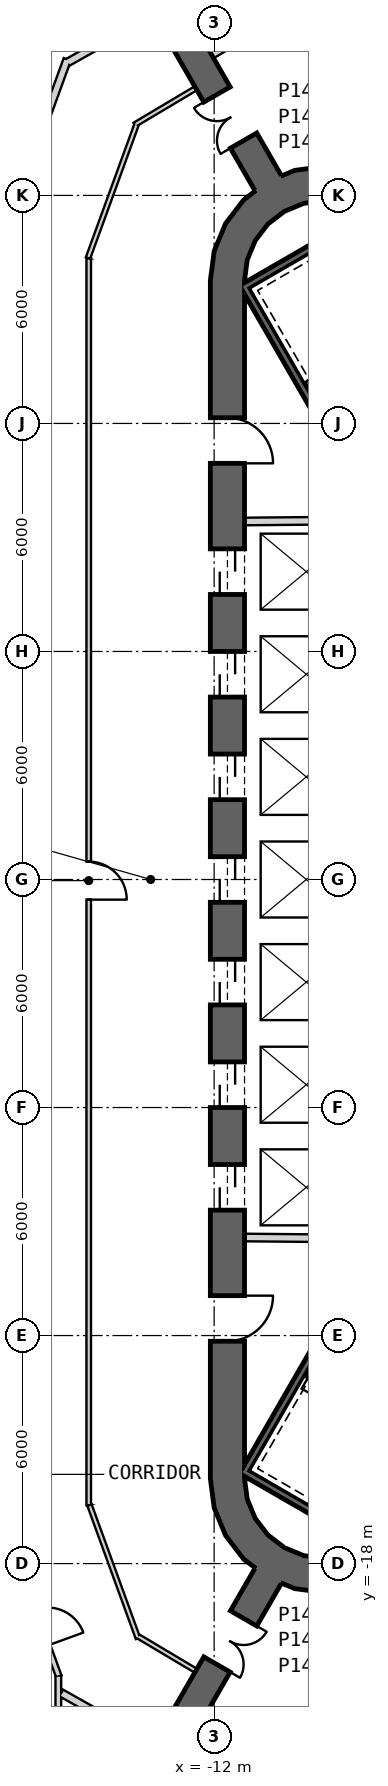
"""IFC4 building model, lengths in metres.
Left out: names, types, materials, properties, quantities, classifications, styles, units other than length and angle.
Written with IfcOpenShell. Run it as: python <this file> out.ifc"""

import sys

from ifc_helpers import new_model, si_unit, direction, frame, frame_2d, origin, place, context, subcontext, project, spatial, polyline, rectangle, outline, extrude, element, fill, save


model = new_model("IFC4")
c1 = context("Model", 3, precision=1e-05, world=origin(), true_north=direction((0.0, 1.0)))
c2 = subcontext(c1, "Body", "Model", "MODEL_VIEW")
j1 = project(units=[si_unit("LENGTHUNIT", "METRE"), si_unit("PLANEANGLEUNIT", "RADIAN")], contexts=[c1])
p1 = place(None, origin())
s1 = spatial("IfcSite", under=j1, at=p1, CompositionType="ELEMENT")
p2 = place(p1, origin())
s2 = spatial("IfcBuilding", under=s1, at=p2, CompositionType="ELEMENT")
p3 = place(p2, frame((0.0, 0.0, 107.0)))
s3 = spatial("IfcBuildingStorey", under=s2, at=p3, CompositionType="ELEMENT", Elevation=107.0)
p4 = place(p3, frame((-11.65, 15.762, 0.0), z_axis=(0.0, 0.0, 1.0), x_axis=(0.0, -1.0, 0.0)))
e1 = element("IfcWall", 1, at=p4, inside=s3, PredefinedType="SHEAR", context=c2, shape_type="SweptSolid", body=[
    extrude(rectangle(XDim=31.523, YDim=0.9, at=frame_2d((15.762, 0.0))), origin(), (0.0, 0.0, 1.0), 4.1),
])
p5 = place(p4, frame((7.062, 0.0, 0.0)))
e2 = element("IfcOpeningElement", 2, at=p5, cuts=e1, PredefinedType="OPENING", context=c2, shape_type="SweptSolid", body=[
    extrude(rectangle(XDim=1.2, YDim=2.4, at=frame_2d((0.6, 1.2))), frame((0.0, 0.46, 0.0), z_axis=(0.0, -1.0, 0.0), x_axis=(1.0, 0.0, 0.0)), (0.0, 0.0, 1.0), 0.92),
])
p6 = place(p4, frame((9.762, 0.0, 0.0)))
e3 = element("IfcOpeningElement", 3, at=p6, cuts=e1, PredefinedType="OPENING", context=c2, shape_type="SweptSolid", body=[
    extrude(rectangle(XDim=1.2, YDim=2.4, at=frame_2d((0.6, 1.2))), frame((0.0, 0.46, 0.0), z_axis=(0.0, -1.0, 0.0), x_axis=(1.0, 0.0, 0.0)), (0.0, 0.0, 1.0), 0.92),
])
p7 = place(p4, frame((12.462, 0.0, 0.0)))
e4 = element("IfcOpeningElement", 4, at=p7, cuts=e1, PredefinedType="OPENING", context=c2, shape_type="SweptSolid", body=[
    extrude(rectangle(XDim=1.2, YDim=2.4, at=frame_2d((0.6, 1.2))), frame((0.0, 0.46, 0.0), z_axis=(0.0, -1.0, 0.0), x_axis=(1.0, 0.0, 0.0)), (0.0, 0.0, 1.0), 0.92),
])
p8 = place(p4, frame((15.162, 0.0, 0.0)))
e5 = element("IfcOpeningElement", 5, at=p8, cuts=e1, PredefinedType="OPENING", context=c2, shape_type="SweptSolid", body=[
    extrude(rectangle(XDim=1.2, YDim=2.4, at=frame_2d((0.6, 1.2))), frame((0.0, 0.46, 0.0), z_axis=(0.0, -1.0, 0.0), x_axis=(1.0, 0.0, 0.0)), (0.0, 0.0, 1.0), 0.92),
])
p9 = place(p4, frame((17.862, 0.0, 0.0)))
e6 = element("IfcOpeningElement", 6, at=p9, cuts=e1, PredefinedType="OPENING", context=c2, shape_type="SweptSolid", body=[
    extrude(rectangle(XDim=1.2, YDim=2.4, at=frame_2d((0.6, 1.2))), frame((0.0, 0.46, 0.0), z_axis=(0.0, -1.0, 0.0), x_axis=(1.0, 0.0, 0.0)), (0.0, 0.0, 1.0), 0.92),
])
p10 = place(p4, frame((20.562, 0.0, 0.0)))
e7 = element("IfcOpeningElement", 7, at=p10, cuts=e1, PredefinedType="OPENING", context=c2, shape_type="SweptSolid", body=[
    extrude(rectangle(XDim=1.2, YDim=2.4, at=frame_2d((0.6, 1.2))), frame((0.0, 0.46, 0.0), z_axis=(0.0, -1.0, 0.0), x_axis=(1.0, 0.0, 0.0)), (0.0, 0.0, 1.0), 0.92),
])
p11 = place(p4, frame((23.262, 0.0, 0.0)))
e8 = element("IfcOpeningElement", 8, at=p11, cuts=e1, PredefinedType="OPENING", context=c2, shape_type="SweptSolid", body=[
    extrude(rectangle(XDim=1.2, YDim=2.4, at=frame_2d((0.6, 1.2))), frame((0.0, 0.46, 0.0), z_axis=(0.0, -1.0, 0.0), x_axis=(1.0, 0.0, 0.0)), (0.0, 0.0, 1.0), 0.92),
])
p12 = place(p4, frame((3.612, 0.0, 0.0)))
e9 = element("IfcOpeningElement", 9, at=p12, cuts=e1, PredefinedType="OPENING", context=c2, shape_type="SweptSolid", body=[
    extrude(rectangle(XDim=1.2, YDim=2.4, at=frame_2d((0.6, 1.2))), frame((0.0, 0.46, 0.0), z_axis=(0.0, -1.0, 0.0), x_axis=(1.0, 0.0, 0.0)), (0.0, 0.0, 1.0), 0.92),
])
p13 = place(p4, frame((26.712, 0.0, 0.0)))
e10 = element("IfcOpeningElement", 10, at=p13, cuts=e1, PredefinedType="OPENING", context=c2, shape_type="SweptSolid", body=[
    extrude(rectangle(XDim=1.2, YDim=2.4, at=frame_2d((0.6, 1.2))), frame((0.0, 0.46, 0.0), z_axis=(0.0, -1.0, 0.0), x_axis=(1.0, 0.0, 0.0)), (0.0, 0.0, 1.0), 0.92),
])
p14 = place(p3, origin())
e11 = element("IfcWall", 11, at=p14, inside=s3, PredefinedType="SHEAR", context=c2, shape_type="SweptSolid", body=[
    extrude(outline(polyline([(-7.6, 18.36), (-8.323, 18.659), (-9.1, 18.762), (-9.876, 18.659), (-10.6, 18.36), (-11.221, 17.883), (-11.698, 17.262), (-11.998, 16.538), (-12.1, 15.762), (-11.2, 15.762), (-11.128, 16.305), (-10.919, 16.812), (-10.585, 17.247), (-10.15, 17.58), (-9.644, 17.79), (-9.1, 17.862), (-8.556, 17.79), (-8.05, 17.58), (-7.6, 18.36)])), origin(), (0.0, 0.0, 1.0), 4.1),
])
p15 = place(p3, origin())
e12 = element("IfcWall", 12, at=p15, inside=s3, PredefinedType="SHEAR", context=c2, shape_type="SweptSolid", body=[
    extrude(outline(polyline([(-12.1, -15.762), (-11.998, -16.538), (-11.698, -17.262), (-11.221, -17.883), (-10.6, -18.36), (-9.876, -18.659), (-9.1, -18.762), (-8.323, -18.659), (-7.6, -18.36), (-8.05, -17.58), (-8.556, -17.79), (-9.1, -17.862), (-9.644, -17.79), (-10.15, -17.58), (-10.585, -17.247), (-10.919, -16.812), (-11.128, -16.305), (-11.2, -15.762), (-12.1, -15.762)])), origin(), (0.0, 0.0, 1.0), 4.1),
])
p16 = place(p3, frame((-10.575, 18.316, 0.0), z_axis=(0.0, 0.0, 1.0), x_axis=(-0.500003112169, 0.866023606965, 0.0)))
e13 = element("IfcWall", 13, at=p16, inside=s3, PredefinedType="SHEAR", context=c2, shape_type="SweptSolid", body=[
    extrude(rectangle(XDim=13.027, YDim=0.8, at=frame_2d((6.513, 0.0))), origin(), (0.0, 0.0, 1.0), 4.1),
])
p17 = place(p16, frame((1.3, 0.0, 0.0)))
e14 = element("IfcOpeningElement", 14, at=p17, cuts=e13, PredefinedType="OPENING", context=c2, shape_type="SweptSolid", body=[
    extrude(rectangle(XDim=1.4, YDim=2.4, at=frame_2d((0.7, 1.2))), frame((0.0, 0.41, 0.0), z_axis=(0.0, -1.0, 0.0), x_axis=(1.0, 0.0, 0.0)), (0.0, 0.0, 1.0), 0.82),
])
p18 = place(p3, frame((-10.575, -18.316, 0.0), z_axis=(0.0, 0.0, 1.0), x_axis=(-0.500003112169, -0.866023606965, 0.0)))
e15 = element("IfcWall", 15, at=p18, inside=s3, PredefinedType="SHEAR", context=c2, shape_type="SweptSolid", body=[
    extrude(rectangle(XDim=13.027, YDim=0.8, at=frame_2d((6.513, 0.0))), origin(), (0.0, 0.0, 1.0), 4.1),
])
p19 = place(p18, frame((1.3, 0.0, 0.0)))
e16 = element("IfcOpeningElement", 16, at=p19, cuts=e15, PredefinedType="OPENING", context=c2, shape_type="SweptSolid", body=[
    extrude(rectangle(XDim=1.4, YDim=2.4, at=frame_2d((0.7, 1.2))), frame((0.0, 0.41, 0.0), z_axis=(0.0, -1.0, 0.0), x_axis=(1.0, 0.0, 0.0)), (0.0, 0.0, 1.0), 0.82),
])
p20 = place(p3, frame((-11.2, 9.42, 0.0), z_axis=(0.0, 0.0, 1.0), x_axis=(0.999957167047, 0.009255488683, 0.0)))
e17 = element("IfcWall", 17, at=p20, inside=s3, PredefinedType="PLUMBINGWALL", context=c2, shape_type="SweptSolid", body=[
    extrude(rectangle(XDim=3.35, YDim=0.2, at=frame_2d((1.675, 0.0))), origin(), (0.0, 0.0, 1.0), 3.8),
])
p21 = place(p3, frame((-8.05, -9.449, 0.0), z_axis=(0.0, 0.0, 1.0), x_axis=(-0.999957467379, 0.009222983926, 0.0)))
e18 = element("IfcWall", 18, at=p21, inside=s3, PredefinedType="PLUMBINGWALL", context=c2, shape_type="SweptSolid", body=[
    extrude(rectangle(XDim=3.15, YDim=0.2, at=frame_2d((1.575, 0.0))), origin(), (0.0, 0.0, 1.0), 3.8),
])
p22 = place(p3, frame((-11.245, 15.678, -0.3), z_axis=(0.0, 0.0, 1.0), x_axis=(0.499977274689, -0.866038523851, 0.0)))
e19 = element("IfcWall", 19, at=p22, inside=s3, PredefinedType="SHEAR", context=c2, shape_type="SweptSolid", body=[
    extrude(rectangle(XDim=8.1, YDim=0.2, at=frame_2d((4.05, 0.0))), origin(), (0.0, 0.0, 1.0), 4.1),
])
for number, where, z_axis, x_axis in (
    (20, (-7.818, 17.541, -0.3), (0.0, 0.0, 1.0), (-0.866, -0.5, 0.0)),
    (21, (-11.282, -15.541, -0.3), (0.0, 0.0, 1.0), (0.866, -0.5, 0.0)),
):
    element("IfcWall", number, at=place(p3, frame(where, z_axis=z_axis, x_axis=x_axis)), inside=s3, PredefinedType="SHEAR", context=c2, shape_type="SweptSolid", body=[
        extrude(rectangle(XDim=3.8, YDim=0.2, at=frame_2d((1.9, 0.0))), origin(), (0.0, 0.0, 1.0), 4.1),
    ])
p23 = place(p3, frame((-7.196, -8.663, -0.3), z_axis=(0.0, 0.0, 1.0), x_axis=(-0.499997992926, -0.866026562566, 0.0)))
e22 = element("IfcWall", 22, at=p23, inside=s3, PredefinedType="SHEAR", context=c2, shape_type="SweptSolid", body=[
    extrude(rectangle(XDim=7.9, YDim=0.2, at=frame_2d((3.95, 0.0))), origin(), (0.0, 0.0, 1.0), 4.1),
])
p24 = place(p3, frame((-12.482, 20.819, 0.0), z_axis=(0.0, 0.0, 1.0), x_axis=(-0.85913200524, -0.511754040113, 0.0)))
e23 = element("IfcWall", 23, at=p24, inside=s3, PredefinedType="PARTITIONING", context=c2, shape_type="SweptSolid", body=[
    extrude(rectangle(XDim=1.875, YDim=0.12, at=frame_2d((0.937, 0.0))), origin(), (0.0, 0.0, 1.0), 3.8),
])
p25 = place(p3, frame((-14.038, 19.872, 0.0), z_axis=(0.0, 0.0, 1.0), x_axis=(-0.342035870777, -0.939686896313, 0.0)))
e24 = element("IfcWall", 24, at=p25, inside=s3, PredefinedType="PARTITIONING", context=c2, shape_type="SweptSolid", body=[
    extrude(rectangle(XDim=3.749, YDim=0.12, at=frame_2d((1.875, 0.0))), origin(), (0.0, 0.0, 1.0), 2.88),
])
p26 = place(p3, frame((-15.3, 16.345, 0.0), z_axis=(0.0, 0.0, 1.0), x_axis=(0.0, -1.0, 0.0)))
e25 = element("IfcWall", 25, at=p26, inside=s3, PredefinedType="PARTITIONING", context=c2, shape_type="SweptSolid", body=[
    extrude(rectangle(XDim=32.811, YDim=0.12, at=frame_2d((16.405, 0.0))), origin(), (0.0, 0.0, 1.0), 2.98),
])
p27 = place(p26, frame((15.875, 0.0, 0.0)))
e26 = element("IfcOpeningElement", 26, at=p27, cuts=e25, PredefinedType="OPENING", context=c2, shape_type="SweptSolid", body=[
    extrude(rectangle(XDim=1.0, YDim=2.1, at=frame_2d((0.5, 1.05))), frame((0.0, 0.07, 0.0), z_axis=(0.0, -1.0, 0.0), x_axis=(1.0, 0.0, 0.0)), (0.0, 0.0, 1.0), 0.14),
])
p28 = place(p3, frame((-15.28, -16.462, 0.0), z_axis=(0.0, 0.0, 1.0), x_axis=(0.34206888523, -0.939674878752, 0.0)))
e27 = element("IfcWall", 27, at=p28, inside=s3, PredefinedType="PARTITIONING", context=c2, shape_type="SweptSolid", body=[
    extrude(rectangle(XDim=3.73, YDim=0.12, at=frame_2d((1.865, 0.0))), origin(), (0.0, 0.0, 1.0), 2.88),
])
p29 = place(p3, frame((-14.005, -19.912, 0.0), z_axis=(0.0, 0.0, 1.0), x_axis=(0.859128591272, -0.511759771435, 0.0)))
e28 = element("IfcWall", 28, at=p29, inside=s3, PredefinedType="PARTITIONING", context=c2, shape_type="SweptSolid", body=[
    extrude(rectangle(XDim=1.773, YDim=0.12, at=frame_2d((0.887, 0.0))), origin(), (0.0, 0.0, 1.0), 3.8),
])
p30 = place(p3, frame((-16.025, -21.403, 0.0), z_axis=(0.0, 0.0, 1.0), x_axis=(0.870940841338, -0.491387882318, 0.0)))
e29 = element("IfcWall", 29, at=p30, inside=s3, PredefinedType="PARTITIONING", context=c2, shape_type="SweptSolid", body=[
    extrude(rectangle(XDim=2.777, YDim=0.2, at=frame_2d((1.388, 0.0))), origin(), (0.0, 0.0, 1.0), 3.8),
])
p31 = place(p3, frame((-15.864, 21.581, 0.0), z_axis=(0.0, 0.0, 1.0), x_axis=(-0.342030631204, -0.939688803444, 0.0)))
e30 = element("IfcWall", 30, at=p31, inside=s3, PredefinedType="PARTITIONING", context=c2, shape_type="SweptSolid", body=[
    extrude(rectangle(XDim=4.976, YDim=0.2, at=frame_2d((2.488, 0.0))), origin(), (0.0, 0.0, 1.0), 2.88),
])
p32 = place(p3, frame((-13.606, 22.767, 0.0), z_axis=(0.0, 0.0, 1.0), x_axis=(-0.870922595713, -0.491420219645, 0.0)))
e31 = element("IfcWall", 31, at=p32, inside=s3, PredefinedType="PARTITIONING", context=c2, shape_type="SweptSolid", body=[
    extrude(rectangle(XDim=2.589, YDim=0.2, at=frame_2d((1.295, 0.0))), origin(), (0.0, 0.0, 1.0), 3.8),
])
p33 = place(p3, frame((-17.019, -18.407, 0.0), z_axis=(0.0, 0.0, 1.0), x_axis=(0.341987834354, -0.939704379661, 0.0)))
e32 = element("IfcWall", 32, at=p33, inside=s3, PredefinedType="PLUMBINGWALL", context=c2, shape_type="SweptSolid", body=[
    extrude(rectangle(XDim=2.723, YDim=0.15, at=frame_2d((1.361, 0.0))), origin(), (0.0, 0.0, 1.0), 2.88),
])
p34 = place(p33, frame((0.862, 0.0, 0.0)))
e33 = element("IfcOpeningElement", 33, at=p34, cuts=e32, PredefinedType="OPENING", context=c2, shape_type="SweptSolid", body=[
    extrude(rectangle(XDim=1.0, YDim=2.1, at=frame_2d((0.5, 1.05))), frame((0.0, 0.085, 0.0), z_axis=(0.0, -1.0, 0.0), x_axis=(1.0, 0.0, 0.0)), (0.0, 0.0, 1.0), 0.17),
])
p35 = place(p3, frame((-10.228, 22.786, 0.0), z_axis=(0.0, 0.0, 1.0), x_axis=(-0.859754348804, -0.510707802674, 0.0)))
e34 = element("IfcWall", 34, at=p35, inside=s3, PredefinedType="PARTITIONING", context=c2, shape_type="SweptSolid", body=[
    extrude(rectangle(XDim=2.135, YDim=0.2, at=frame_2d((1.068, 0.0))), origin(), (0.0, 0.0, 1.0), 3.8),
])
p36 = place(p3, frame((-16.1, -22.268, 0.0), z_axis=(0.0, 0.0, 1.0), x_axis=(0.0, 1.0, 0.0)))
e35 = element("IfcWall", 35, at=p36, inside=s3, PredefinedType="PLUMBINGWALL", context=c2, shape_type="SweptSolid", body=[
    extrude(rectangle(XDim=1.32, YDim=0.15, at=frame_2d((0.66, 0.0))), origin(), (0.0, 0.0, 1.0), 2.88),
])
p37 = place(p27, origin())
e36 = element("IfcDoor", 36, at=p37, inside=s3, OperationType="SINGLE_SWING_LEFT", PredefinedType="NOTDEFINED", context=c2, shape_type="SweptSolid", body=[
    extrude(rectangle(XDim=1.0, YDim=2.1, at=frame_2d((0.5, 1.05))), frame((0.0, 0.025, 0.0), z_axis=(0.0, -1.0, 0.0), x_axis=(1.0, 0.0, 0.0)), (0.0, 0.0, 1.0), 0.05),
])
fill(e26, e36)
p38 = place(p5, origin())
e37 = element("IfcDoor", 37, at=p38, inside=s3, OperationType="SLIDING_TO_LEFT", PredefinedType="USERDEFINED", context=c2, shape_type="SweptSolid", body=[
    extrude(rectangle(XDim=1.2, YDim=2.4, at=frame_2d((0.6, 1.2))), frame((0.0, 0.025, 0.0), z_axis=(0.0, -1.0, 0.0), x_axis=(1.0, 0.0, 0.0)), (0.0, 0.0, 1.0), 0.05),
])
fill(e2, e37)
p39 = place(p6, origin())
e38 = element("IfcDoor", 38, at=p39, inside=s3, OperationType="SLIDING_TO_LEFT", PredefinedType="USERDEFINED", context=c2, shape_type="SweptSolid", body=[
    extrude(rectangle(XDim=1.2, YDim=2.4, at=frame_2d((0.6, 1.2))), frame((0.0, 0.025, 0.0), z_axis=(0.0, -1.0, 0.0), x_axis=(1.0, 0.0, 0.0)), (0.0, 0.0, 1.0), 0.05),
])
fill(e3, e38)
p40 = place(p7, origin())
e39 = element("IfcDoor", 39, at=p40, inside=s3, OperationType="SLIDING_TO_LEFT", PredefinedType="USERDEFINED", context=c2, shape_type="SweptSolid", body=[
    extrude(rectangle(XDim=1.2, YDim=2.4, at=frame_2d((0.6, 1.2))), frame((0.0, 0.025, 0.0), z_axis=(0.0, -1.0, 0.0), x_axis=(1.0, 0.0, 0.0)), (0.0, 0.0, 1.0), 0.05),
])
fill(e4, e39)
p41 = place(p8, origin())
e40 = element("IfcDoor", 40, at=p41, inside=s3, OperationType="SLIDING_TO_LEFT", PredefinedType="USERDEFINED", context=c2, shape_type="SweptSolid", body=[
    extrude(rectangle(XDim=1.2, YDim=2.4, at=frame_2d((0.6, 1.2))), frame((0.0, 0.025, 0.0), z_axis=(0.0, -1.0, 0.0), x_axis=(1.0, 0.0, 0.0)), (0.0, 0.0, 1.0), 0.05),
])
fill(e5, e40)
p42 = place(p9, origin())
e41 = element("IfcDoor", 41, at=p42, inside=s3, OperationType="SLIDING_TO_LEFT", PredefinedType="USERDEFINED", context=c2, shape_type="SweptSolid", body=[
    extrude(rectangle(XDim=1.2, YDim=2.4, at=frame_2d((0.6, 1.2))), frame((0.0, 0.025, 0.0), z_axis=(0.0, -1.0, 0.0), x_axis=(1.0, 0.0, 0.0)), (0.0, 0.0, 1.0), 0.05),
])
fill(e6, e41)
p43 = place(p10, origin())
e42 = element("IfcDoor", 42, at=p43, inside=s3, OperationType="SLIDING_TO_LEFT", PredefinedType="USERDEFINED", context=c2, shape_type="SweptSolid", body=[
    extrude(rectangle(XDim=1.2, YDim=2.4, at=frame_2d((0.6, 1.2))), frame((0.0, 0.025, 0.0), z_axis=(0.0, -1.0, 0.0), x_axis=(1.0, 0.0, 0.0)), (0.0, 0.0, 1.0), 0.05),
])
fill(e7, e42)
p44 = place(p11, origin())
e43 = element("IfcDoor", 43, at=p44, inside=s3, OperationType="SLIDING_TO_LEFT", PredefinedType="USERDEFINED", context=c2, shape_type="SweptSolid", body=[
    extrude(rectangle(XDim=1.2, YDim=2.4, at=frame_2d((0.6, 1.2))), frame((0.0, 0.025, 0.0), z_axis=(0.0, -1.0, 0.0), x_axis=(1.0, 0.0, 0.0)), (0.0, 0.0, 1.0), 0.05),
])
fill(e8, e43)
p45 = place(p12, origin())
e44 = element("IfcDoor", 44, at=p45, inside=s3, OperationType="SINGLE_SWING_LEFT", PredefinedType="USERDEFINED", context=c2, shape_type="SweptSolid", body=[
    extrude(rectangle(XDim=1.2, YDim=2.4, at=frame_2d((0.6, 1.2))), frame((0.0, 0.025, 0.0), z_axis=(0.0, -1.0, 0.0), x_axis=(1.0, 0.0, 0.0)), (0.0, 0.0, 1.0), 0.05),
])
fill(e9, e44)
p46 = place(p13, origin())
e45 = element("IfcDoor", 45, at=p46, inside=s3, OperationType="SINGLE_SWING_LEFT", PredefinedType="USERDEFINED", context=c2, shape_type="SweptSolid", body=[
    extrude(rectangle(XDim=1.2, YDim=2.4, at=frame_2d((0.6, 1.2))), frame((0.0, 0.025, 0.0), z_axis=(0.0, -1.0, 0.0), x_axis=(1.0, 0.0, 0.0)), (0.0, 0.0, 1.0), 0.05),
])
fill(e10, e45)
p47 = place(p17, origin())
e46 = element("IfcDoor", 46, at=p47, inside=s3, OperationType="DOUBLE_DOOR_SINGLE_SWING", PredefinedType="NOTDEFINED", context=c2, shape_type="SweptSolid", body=[
    extrude(rectangle(XDim=1.4, YDim=2.4, at=frame_2d((0.7, 1.2))), frame((0.0, 0.025, 0.0), z_axis=(0.0, -1.0, 0.0), x_axis=(1.0, 0.0, 0.0)), (0.0, 0.0, 1.0), 0.05),
])
fill(e14, e46)
p48 = place(p19, origin())
e47 = element("IfcDoor", 47, at=p48, inside=s3, OperationType="DOUBLE_DOOR_SINGLE_SWING", PredefinedType="NOTDEFINED", context=c2, shape_type="SweptSolid", body=[
    extrude(rectangle(XDim=1.4, YDim=2.4, at=frame_2d((0.7, 1.2))), frame((0.0, 0.025, 0.0), z_axis=(0.0, -1.0, 0.0), x_axis=(1.0, 0.0, 0.0)), (0.0, 0.0, 1.0), 0.05),
])
fill(e16, e47)
save(model, sys.argv[1])
